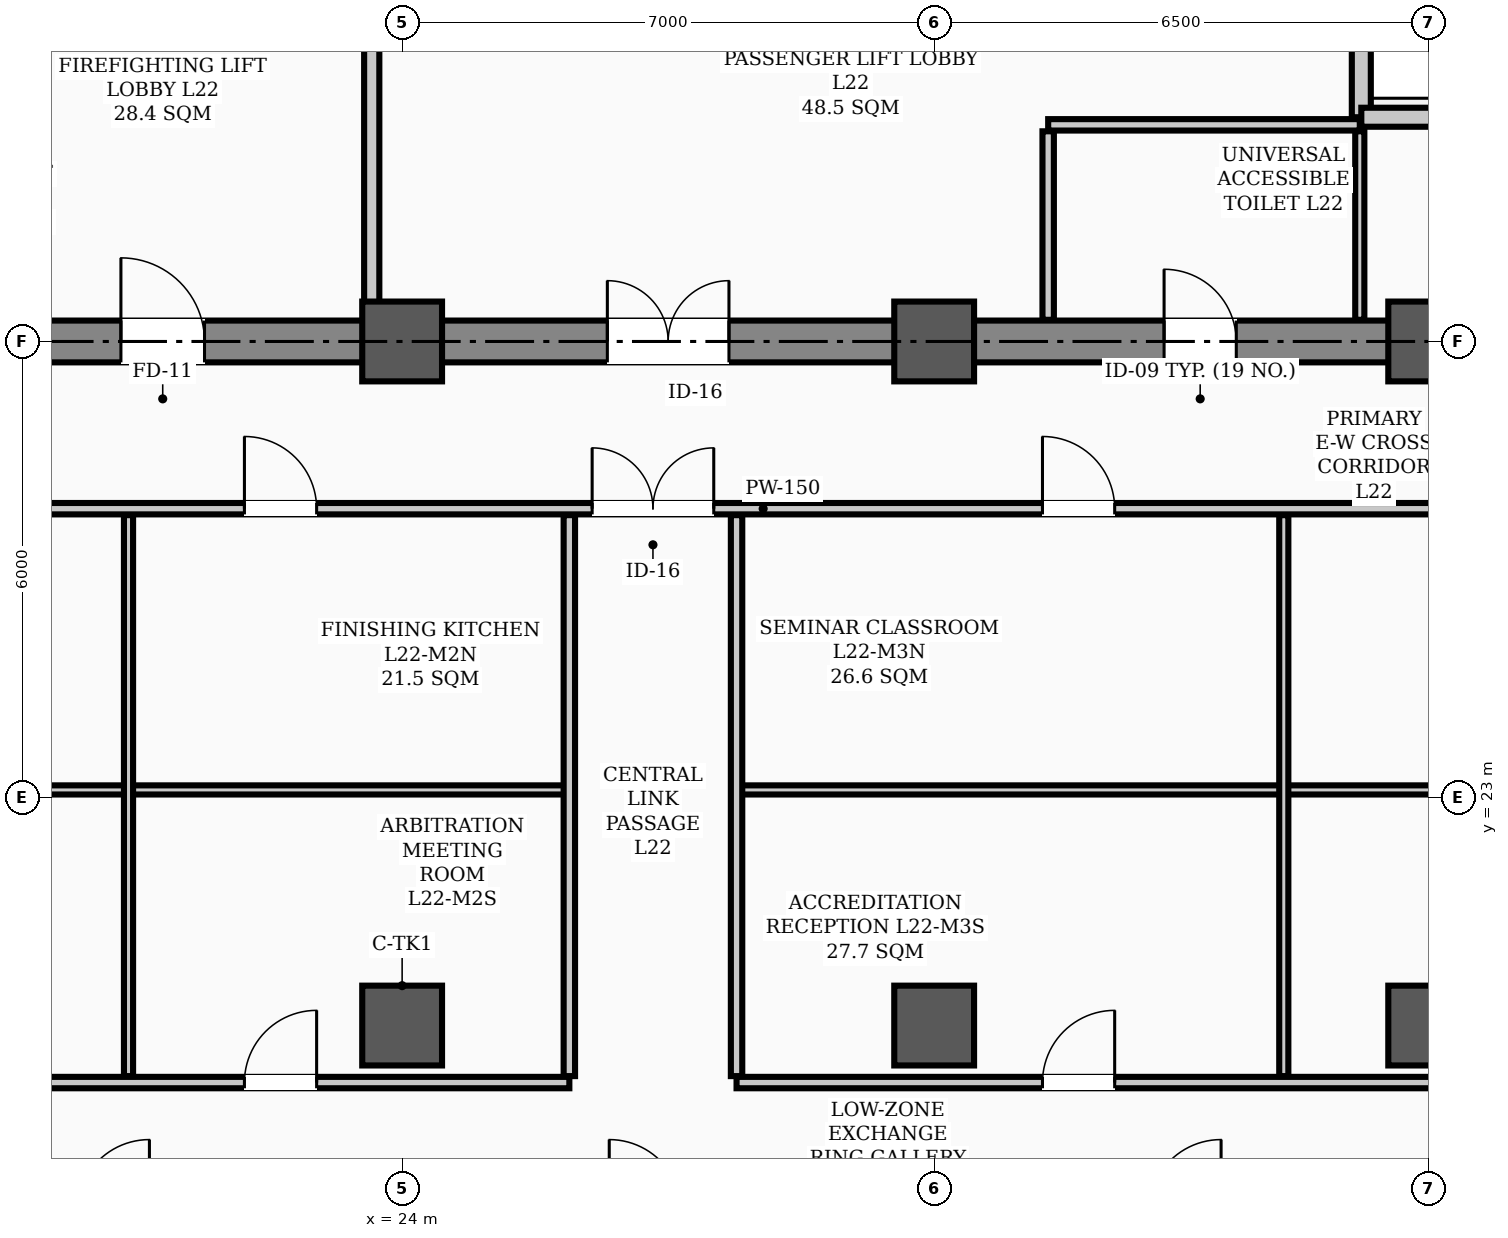
"""IFC4 building model, lengths in metres.
Left out: names, types, materials, properties, quantities, classifications, styles, units other than length and angle.
Written with IfcOpenShell. Run it as: python <this file> out.ifc"""

import sys

from ifc_helpers import new_model, si_unit, direction, frame, frame_2d, origin, origin_2d, place, context, subcontext, project, spatial, rectangle, hollow_rectangle, extrude, element, fill, save


model = new_model("IFC4")
c1 = context("Model", 3, precision=1e-05, world=origin(), true_north=direction((0.0, 1.0)))
c2 = subcontext(c1, "Body", "Model", "MODEL_VIEW")
j1 = project(units=[si_unit("LENGTHUNIT", "METRE"), si_unit("PLANEANGLEUNIT", "RADIAN")], contexts=[c1])
p1 = place(None, origin())
s1 = spatial("IfcSite", under=j1, at=p1, CompositionType="ELEMENT")
p2 = place(p1, origin())
s2 = spatial("IfcBuilding", under=s1, at=p2, CompositionType="ELEMENT")
p3 = place(p2, frame((0.0, 0.0, 88.9)))
s3 = spatial("IfcBuildingStorey", under=s2, at=p3, CompositionType="ELEMENT", Elevation=88.9)
for number, where, z_axis, x_axis in (
    (1, (24.0, 29.0, 0.0), (0.0, 0.0, 1.0), (1.0, 0.0, 0.0)),
    (2, (31.0, 29.0, 0.0), (0.0, 0.0, 1.0), (1.0, 0.0, 0.0)),
    (3, (37.5, 29.0, 0.0), (0.0, 0.0, 1.0), (1.0, 0.0, 0.0)),
    (4, (24.0, 20.0, 0.0), (0.0, 0.0, 1.0), (1.0, 0.0, 0.0)),
    (5, (31.0, 20.0, 0.0), (0.0, 0.0, 1.0), (1.0, 0.0, 0.0)),
    (6, (37.5, 20.0, 0.0), (0.0, 0.0, 1.0), (1.0, 0.0, 0.0)),
):
    element("IfcColumn", number, at=place(p3, frame(where, z_axis=z_axis, x_axis=x_axis)), inside=s3, PredefinedType="COLUMN", context=c2, shape_type="SweptSolid", body=[
        extrude(hollow_rectangle(XDim=1.05, YDim=1.05, WallThickness=0.038, InnerFilletRadius=0.019, OuterFilletRadius=0.057, at=origin_2d()), origin(), (0.0, 0.0, 1.0), 3.9),
    ])
p4 = place(p3, frame((13.5, 29.0, 0.0), z_axis=(0.0, 0.0, 1.0), x_axis=(1.0, 0.0, 0.0)))
e7 = element("IfcWall", 7, at=p4, inside=s3, PredefinedType="SHEAR", context=c2, shape_type="SweptSolid", body=[
    extrude(rectangle(XDim=30.5, YDim=0.55, at=frame_2d((15.25, 0.0))), origin(), (0.0, 0.0, 1.0), 3.72),
])
p5 = place(p4, frame((1.75, 0.0, 0.0)))
e8 = element("IfcOpeningElement", 8, at=p5, cuts=e7, PredefinedType="OPENING", context=c2, shape_type="SweptSolid", body=[
    extrude(rectangle(XDim=1.1, YDim=2.08, at=frame_2d((0.55, 1.04))), frame((0.0, 0.285, 0.0), z_axis=(0.0, -1.0, 0.0), x_axis=(1.0, 0.0, 0.0)), (0.0, 0.0, 1.0), 0.57),
])
p6 = place(p4, frame((26.7, 0.0, 0.0)))
e9 = element("IfcOpeningElement", 9, at=p6, cuts=e7, PredefinedType="OPENING", context=c2, shape_type="SweptSolid", body=[
    extrude(rectangle(XDim=1.1, YDim=2.08, at=frame_2d((0.55, 1.04))), frame((0.0, 0.285, 0.0), z_axis=(0.0, -1.0, 0.0), x_axis=(1.0, 0.0, 0.0)), (0.0, 0.0, 1.0), 0.57),
])
p7 = place(p4, frame((6.8, 0.0, 0.0)))
e10 = element("IfcOpeningElement", 10, at=p7, cuts=e7, PredefinedType="OPENING", context=c2, shape_type="SweptSolid", body=[
    extrude(rectangle(XDim=1.1, YDim=2.08, at=frame_2d((0.55, 1.04))), frame((0.0, 0.285, 0.0), z_axis=(0.0, -1.0, 0.0), x_axis=(1.0, 0.0, 0.0)), (0.0, 0.0, 1.0), 0.57),
])
p8 = place(p4, frame((13.2, 0.0, 0.0)))
e11 = element("IfcOpeningElement", 11, at=p8, cuts=e7, PredefinedType="OPENING", context=c2, shape_type="SweptSolid", body=[
    extrude(rectangle(XDim=1.6, YDim=2.08, at=frame_2d((0.8, 1.04))), frame((0.0, 0.285, 0.0), z_axis=(0.0, -1.0, 0.0), x_axis=(1.0, 0.0, 0.0)), (0.0, 0.0, 1.0), 0.57),
])
p9 = place(p4, frame((20.525, 0.0, 0.0)))
e12 = element("IfcOpeningElement", 12, at=p9, cuts=e7, PredefinedType="OPENING", context=c2, shape_type="SweptSolid", body=[
    extrude(rectangle(XDim=0.95, YDim=2.08, at=frame_2d((0.475, 1.04))), frame((0.0, 0.285, 0.0), z_axis=(0.0, -1.0, 0.0), x_axis=(1.0, 0.0, 0.0)), (0.0, 0.0, 1.0), 0.57),
])
p10 = place(p3, frame((36.62, 31.95, 0.0), z_axis=(0.0, 0.0, 1.0), x_axis=(0.0, 1.0, 0.0)))
e13 = element("IfcWall", 13, at=p10, inside=s3, PredefinedType="STANDARD", context=c2, shape_type="SweptSolid", body=[
    extrude(rectangle(XDim=6.0, YDim=0.25, at=frame_2d((3.0, 0.0))), origin(), (0.0, 0.0, 1.0), 3.3),
])
p11 = place(p10, frame((0.9, 0.0, 0.0)))
e14 = element("IfcOpeningElement", 14, at=p11, cuts=e13, PredefinedType="OPENING", context=c2, shape_type="SweptSolid", body=[
    extrude(rectangle(XDim=1.1, YDim=2.08, at=frame_2d((0.55, 1.04))), frame((0.0, 0.135, 0.0), z_axis=(0.0, -1.0, 0.0), x_axis=(1.0, 0.0, 0.0)), (0.0, 0.0, 1.0), 0.27),
])
p12 = place(p10, frame((4.0, 0.0, 0.0)))
e15 = element("IfcOpeningElement", 15, at=p12, cuts=e13, PredefinedType="OPENING", context=c2, shape_type="SweptSolid", body=[
    extrude(rectangle(XDim=1.1, YDim=2.08, at=frame_2d((0.55, 1.04))), frame((0.0, 0.135, 0.0), z_axis=(0.0, -1.0, 0.0), x_axis=(1.0, 0.0, 0.0)), (0.0, 0.0, 1.0), 0.27),
])
p13 = place(p3, frame((36.62, 31.95, 0.0), z_axis=(0.0, 0.0, 1.0), x_axis=(1.0, 0.0, 0.0)))
e16 = element("IfcWall", 16, at=p13, inside=s3, PredefinedType="STANDARD", context=c2, shape_type="SweptSolid", body=[
    extrude(rectangle(XDim=1.9, YDim=0.25, at=frame_2d((0.95, 0.0))), origin(), (0.0, 0.0, 1.0), 3.48),
])
p14 = place(p3, frame((32.5, 31.85, 0.0), z_axis=(0.0, 0.0, 1.0), x_axis=(1.0, 0.0, 0.0)))
e17 = element("IfcWall", 17, at=p14, inside=s3, PredefinedType="PARTITIONING", context=c2, shape_type="SweptSolid", body=[
    extrude(rectangle(XDim=4.1, YDim=0.15, at=frame_2d((2.05, 0.0))), origin(), (0.0, 0.0, 1.0), 3.72),
])
p15 = place(p3, frame((12.9, 26.8, 0.0), z_axis=(0.0, 0.0, 1.0), x_axis=(1.0, 0.0, 0.0)))
e18 = element("IfcWall", 18, at=p15, inside=s3, PredefinedType="PARTITIONING", context=c2, shape_type="SweptSolid", body=[
    extrude(rectangle(XDim=31.7, YDim=0.15, at=frame_2d((15.85, 0.0))), origin(), (0.0, 0.0, 1.0), 3.1),
])
p16 = place(p15, frame((13.6, 0.0, 0.0)))
e19 = element("IfcOpeningElement", 19, at=p16, cuts=e18, PredefinedType="OPENING", context=c2, shape_type="SweptSolid", body=[
    extrude(rectangle(XDim=1.6, YDim=2.08, at=frame_2d((0.8, 1.04))), frame((0.0, 0.085, 0.0), z_axis=(0.0, -1.0, 0.0), x_axis=(1.0, 0.0, 0.0)), (0.0, 0.0, 1.0), 0.17),
])
p17 = place(p15, frame((3.275, 0.0, 0.0)))
e20 = element("IfcOpeningElement", 20, at=p17, cuts=e18, PredefinedType="OPENING", context=c2, shape_type="SweptSolid", body=[
    extrude(rectangle(XDim=0.95, YDim=2.08, at=frame_2d((0.475, 1.04))), frame((0.0, 0.085, 0.0), z_axis=(0.0, -1.0, 0.0), x_axis=(1.0, 0.0, 0.0)), (0.0, 0.0, 1.0), 0.17),
])
p18 = place(p15, frame((9.025, 0.0, 0.0)))
e21 = element("IfcOpeningElement", 21, at=p18, cuts=e18, PredefinedType="OPENING", context=c2, shape_type="SweptSolid", body=[
    extrude(rectangle(XDim=0.95, YDim=2.08, at=frame_2d((0.475, 1.04))), frame((0.0, 0.085, 0.0), z_axis=(0.0, -1.0, 0.0), x_axis=(1.0, 0.0, 0.0)), (0.0, 0.0, 1.0), 0.17),
])
p19 = place(p15, frame((19.525, 0.0, 0.0)))
e22 = element("IfcOpeningElement", 22, at=p19, cuts=e18, PredefinedType="OPENING", context=c2, shape_type="SweptSolid", body=[
    extrude(rectangle(XDim=0.95, YDim=2.08, at=frame_2d((0.475, 1.04))), frame((0.0, 0.085, 0.0), z_axis=(0.0, -1.0, 0.0), x_axis=(1.0, 0.0, 0.0)), (0.0, 0.0, 1.0), 0.17),
])
p20 = place(p15, frame((26.725, 0.0, 0.0)))
e23 = element("IfcOpeningElement", 23, at=p20, cuts=e18, PredefinedType="OPENING", context=c2, shape_type="SweptSolid", body=[
    extrude(rectangle(XDim=0.95, YDim=2.08, at=frame_2d((0.475, 1.04))), frame((0.0, 0.085, 0.0), z_axis=(0.0, -1.0, 0.0), x_axis=(1.0, 0.0, 0.0)), (0.0, 0.0, 1.0), 0.17),
])
p21 = place(p3, frame((12.9, 19.25, 0.0), z_axis=(0.0, 0.0, 1.0), x_axis=(1.0, 0.0, 0.0)))
e24 = element("IfcWall", 24, at=p21, inside=s3, PredefinedType="PARTITIONING", context=c2, shape_type="SweptSolid", body=[
    extrude(rectangle(XDim=13.3, YDim=0.15, at=frame_2d((6.65, 0.0))), origin(), (0.0, 0.0, 1.0), 3.1),
])
p22 = place(p21, frame((3.275, 0.0, 0.0)))
e25 = element("IfcOpeningElement", 25, at=p22, cuts=e24, PredefinedType="OPENING", context=c2, shape_type="SweptSolid", body=[
    extrude(rectangle(XDim=0.95, YDim=2.08, at=frame_2d((0.475, 1.04))), frame((0.0, 0.085, 0.0), z_axis=(0.0, -1.0, 0.0), x_axis=(1.0, 0.0, 0.0)), (0.0, 0.0, 1.0), 0.17),
])
p23 = place(p21, frame((9.025, 0.0, 0.0)))
e26 = element("IfcOpeningElement", 26, at=p23, cuts=e24, PredefinedType="OPENING", context=c2, shape_type="SweptSolid", body=[
    extrude(rectangle(XDim=0.95, YDim=2.08, at=frame_2d((0.475, 1.04))), frame((0.0, 0.085, 0.0), z_axis=(0.0, -1.0, 0.0), x_axis=(1.0, 0.0, 0.0)), (0.0, 0.0, 1.0), 0.17),
])
p24 = place(p3, frame((28.4, 19.25, 0.0), z_axis=(0.0, 0.0, 1.0), x_axis=(1.0, 0.0, 0.0)))
e27 = element("IfcWall", 27, at=p24, inside=s3, PredefinedType="PARTITIONING", context=c2, shape_type="SweptSolid", body=[
    extrude(rectangle(XDim=16.2, YDim=0.15, at=frame_2d((8.1, 0.0))), origin(), (0.0, 0.0, 1.0), 3.1),
])
p25 = place(p24, frame((4.025, 0.0, 0.0)))
e28 = element("IfcOpeningElement", 28, at=p25, cuts=e27, PredefinedType="OPENING", context=c2, shape_type="SweptSolid", body=[
    extrude(rectangle(XDim=0.95, YDim=2.08, at=frame_2d((0.475, 1.04))), frame((0.0, 0.085, 0.0), z_axis=(0.0, -1.0, 0.0), x_axis=(1.0, 0.0, 0.0)), (0.0, 0.0, 1.0), 0.17),
])
p26 = place(p24, frame((11.225, 0.0, 0.0)))
e29 = element("IfcOpeningElement", 29, at=p26, cuts=e27, PredefinedType="OPENING", context=c2, shape_type="SweptSolid", body=[
    extrude(rectangle(XDim=0.95, YDim=2.08, at=frame_2d((0.475, 1.04))), frame((0.0, 0.085, 0.0), z_axis=(0.0, -1.0, 0.0), x_axis=(1.0, 0.0, 0.0)), (0.0, 0.0, 1.0), 0.17),
])
p27 = place(p3, frame((12.9, 23.1, 0.0), z_axis=(0.0, 0.0, 1.0), x_axis=(1.0, 0.0, 0.0)))
e30 = element("IfcWall", 30, at=p27, inside=s3, PredefinedType="PARTITIONING", context=c2, shape_type="SweptSolid", body=[
    extrude(rectangle(XDim=7.5, YDim=0.12, at=frame_2d((3.75, 0.0))), origin(), (0.0, 0.0, 1.0), 3.1),
])
p28 = place(p3, frame((20.4, 23.1, 0.0), z_axis=(0.0, 0.0, 1.0), x_axis=(1.0, 0.0, 0.0)))
e31 = element("IfcWall", 31, at=p28, inside=s3, PredefinedType="PARTITIONING", context=c2, shape_type="SweptSolid", body=[
    extrude(rectangle(XDim=5.8, YDim=0.12, at=frame_2d((2.9, 0.0))), origin(), (0.0, 0.0, 1.0), 3.1),
])
p29 = place(p3, frame((28.4, 23.1, 0.0), z_axis=(0.0, 0.0, 1.0), x_axis=(1.0, 0.0, 0.0)))
e32 = element("IfcWall", 32, at=p29, inside=s3, PredefinedType="PARTITIONING", context=c2, shape_type="SweptSolid", body=[
    extrude(rectangle(XDim=7.2, YDim=0.12, at=frame_2d((3.6, 0.0))), origin(), (0.0, 0.0, 1.0), 3.1),
])
p30 = place(p3, frame((35.6, 23.1, 0.0), z_axis=(0.0, 0.0, 1.0), x_axis=(1.0, 0.0, 0.0)))
e33 = element("IfcWall", 33, at=p30, inside=s3, PredefinedType="PARTITIONING", context=c2, shape_type="SweptSolid", body=[
    extrude(rectangle(XDim=9.0, YDim=0.12, at=frame_2d((4.5, 0.0))), origin(), (0.0, 0.0, 1.0), 3.1),
])
p31 = place(p3, frame((23.6, 29.285, 0.0), z_axis=(0.0, 0.0, 1.0), x_axis=(0.0, 1.0, 0.0)))
e34 = element("IfcWall", 34, at=p31, inside=s3, PredefinedType="STANDARD", context=c2, shape_type="SweptSolid", body=[
    extrude(rectangle(XDim=5.415, YDim=0.2, at=frame_2d((2.708, 0.0))), origin(), (0.0, 0.0, 1.0), 3.1),
])
p32 = place(p3, frame((32.5, 29.285, 0.0), z_axis=(0.0, 0.0, 1.0), x_axis=(0.0, 1.0, 0.0)))
e35 = element("IfcWall", 35, at=p32, inside=s3, PredefinedType="PARTITIONING", context=c2, shape_type="SweptSolid", body=[
    extrude(rectangle(XDim=2.48, YDim=0.15, at=frame_2d((1.24, 0.0))), origin(), (0.0, 0.0, 1.0), 3.3),
])
p33 = place(p3, frame((36.6, 29.285, 0.0), z_axis=(0.0, 0.0, 1.0), x_axis=(0.0, 1.0, 0.0)))
e36 = element("IfcWall", 36, at=p33, inside=s3, PredefinedType="PARTITIONING", context=c2, shape_type="SweptSolid", body=[
    extrude(rectangle(XDim=2.48, YDim=0.12, at=frame_2d((1.24, 0.0))), origin(), (0.0, 0.0, 1.0), 3.3),
])
for number, where, z_axis, x_axis in (
    (37, (26.2, 19.335, 0.0), (0.0, 0.0, 1.0), (0.0, 1.0, 0.0)),
    (38, (28.4, 19.335, 0.0), (0.0, 0.0, 1.0), (0.0, 1.0, 0.0)),
):
    element("IfcWall", number, at=place(p3, frame(where, z_axis=z_axis, x_axis=x_axis)), inside=s3, PredefinedType="PARTITIONING", context=c2, shape_type="SweptSolid", body=[
        extrude(rectangle(XDim=7.38, YDim=0.15, at=frame_2d((3.69, 0.0))), origin(), (0.0, 0.0, 1.0), 3.0),
    ])
for number, where, z_axis, x_axis in (
    (39, (20.4, 19.335, 0.0), (0.0, 0.0, 1.0), (0.0, 1.0, 0.0)),
    (40, (35.6, 19.335, 0.0), (0.0, 0.0, 1.0), (0.0, 1.0, 0.0)),
):
    element("IfcWall", number, at=place(p3, frame(where, z_axis=z_axis, x_axis=x_axis)), inside=s3, PredefinedType="PARTITIONING", context=c2, shape_type="SweptSolid", body=[
        extrude(rectangle(XDim=7.38, YDim=0.12, at=frame_2d((3.69, 0.0))), origin(), (0.0, 0.0, 1.0), 3.0),
    ])
p34 = place(p7, origin())
e41 = element("IfcDoor", 41, at=p34, inside=s3, OperationType="SINGLE_SWING_LEFT", PredefinedType="DOOR", context=c2, shape_type="SweptSolid", body=[
    extrude(rectangle(XDim=1.1, YDim=2.08, at=frame_2d((0.55, 1.04))), frame((0.0, 0.025, 0.0), z_axis=(0.0, -1.0, 0.0), x_axis=(1.0, 0.0, 0.0)), (0.0, 0.0, 1.0), 0.05),
])
fill(e10, e41)
p35 = place(p8, origin())
e42 = element("IfcDoor", 42, at=p35, inside=s3, OperationType="DOUBLE_DOOR_SINGLE_SWING", PredefinedType="DOOR", context=c2, shape_type="SweptSolid", body=[
    extrude(rectangle(XDim=1.6, YDim=2.08, at=frame_2d((0.8, 1.04))), frame((0.0, 0.025, 0.0), z_axis=(0.0, -1.0, 0.0), x_axis=(1.0, 0.0, 0.0)), (0.0, 0.0, 1.0), 0.05),
])
fill(e11, e42)
p36 = place(p9, origin())
e43 = element("IfcDoor", 43, at=p36, inside=s3, OperationType="SINGLE_SWING_LEFT", PredefinedType="DOOR", context=c2, shape_type="SweptSolid", body=[
    extrude(rectangle(XDim=0.95, YDim=2.08, at=frame_2d((0.475, 1.04))), frame((0.0, 0.025, 0.0), z_axis=(0.0, -1.0, 0.0), x_axis=(1.0, 0.0, 0.0)), (0.0, 0.0, 1.0), 0.05),
])
fill(e12, e43)
p37 = place(p16, origin())
e44 = element("IfcDoor", 44, at=p37, inside=s3, OperationType="DOUBLE_DOOR_SINGLE_SWING", PredefinedType="DOOR", context=c2, shape_type="SweptSolid", body=[
    extrude(rectangle(XDim=1.6, YDim=2.08, at=frame_2d((0.8, 1.04))), frame((0.0, 0.025, 0.0), z_axis=(0.0, -1.0, 0.0), x_axis=(1.0, 0.0, 0.0)), (0.0, 0.0, 1.0), 0.05),
])
fill(e19, e44)
p38 = place(p18, origin())
e45 = element("IfcDoor", 45, at=p38, inside=s3, OperationType="SINGLE_SWING_LEFT", PredefinedType="DOOR", context=c2, shape_type="SweptSolid", body=[
    extrude(rectangle(XDim=0.95, YDim=2.08, at=frame_2d((0.475, 1.04))), frame((0.0, 0.025, 0.0), z_axis=(0.0, -1.0, 0.0), x_axis=(1.0, 0.0, 0.0)), (0.0, 0.0, 1.0), 0.05),
])
fill(e21, e45)
p39 = place(p23, origin())
e46 = element("IfcDoor", 46, at=p39, inside=s3, OperationType="SINGLE_SWING_RIGHT", PredefinedType="DOOR", context=c2, shape_type="SweptSolid", body=[
    extrude(rectangle(XDim=0.95, YDim=2.08, at=frame_2d((0.475, 1.04))), frame((0.0, 0.025, 0.0), z_axis=(0.0, -1.0, 0.0), x_axis=(1.0, 0.0, 0.0)), (0.0, 0.0, 1.0), 0.05),
])
fill(e26, e46)
p40 = place(p19, origin())
e47 = element("IfcDoor", 47, at=p40, inside=s3, OperationType="SINGLE_SWING_LEFT", PredefinedType="DOOR", context=c2, shape_type="SweptSolid", body=[
    extrude(rectangle(XDim=0.95, YDim=2.08, at=frame_2d((0.475, 1.04))), frame((0.0, 0.025, 0.0), z_axis=(0.0, -1.0, 0.0), x_axis=(1.0, 0.0, 0.0)), (0.0, 0.0, 1.0), 0.05),
])
fill(e22, e47)
p41 = place(p25, origin())
e48 = element("IfcDoor", 48, at=p41, inside=s3, OperationType="SINGLE_SWING_RIGHT", PredefinedType="DOOR", context=c2, shape_type="SweptSolid", body=[
    extrude(rectangle(XDim=0.95, YDim=2.08, at=frame_2d((0.475, 1.04))), frame((0.0, 0.025, 0.0), z_axis=(0.0, -1.0, 0.0), x_axis=(1.0, 0.0, 0.0)), (0.0, 0.0, 1.0), 0.05),
])
fill(e28, e48)
save(model, sys.argv[1])
